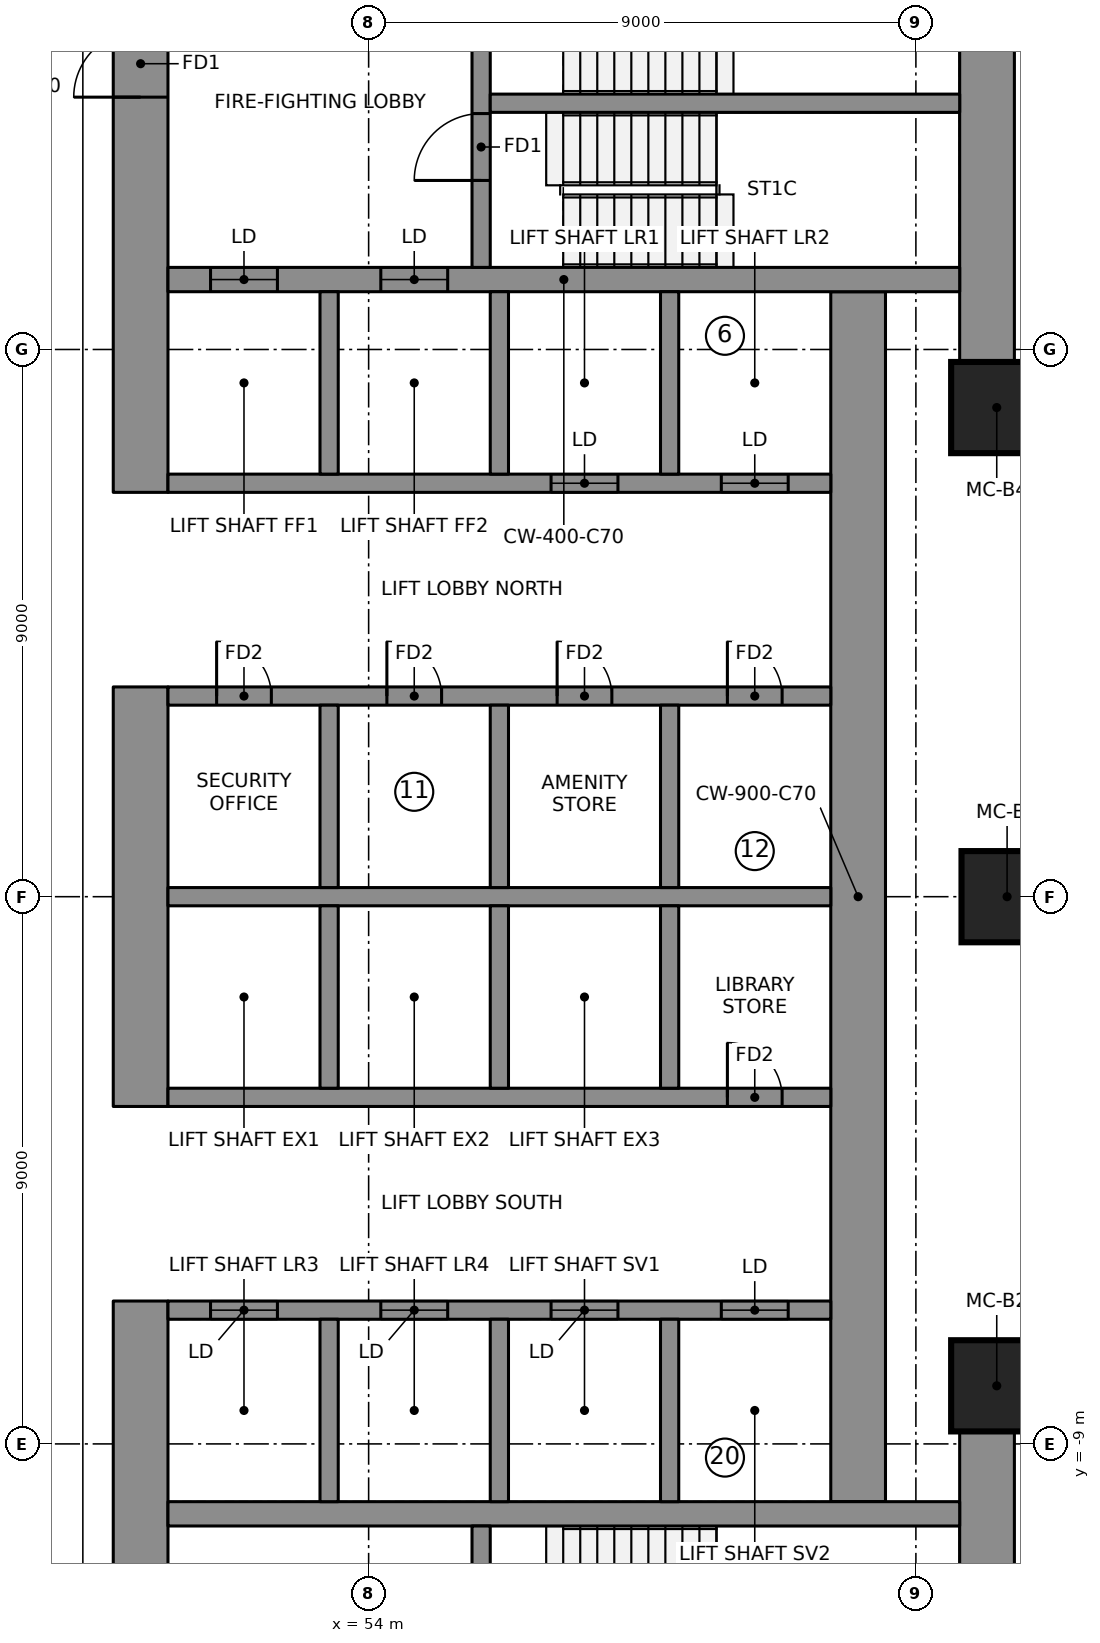
"""IFC4 building model, lengths in metres.
Left out: names, types, materials, properties, quantities, classifications, styles, units other than length and angle.
Written with IfcOpenShell. Run it as: python <this file> out.ifc"""

import sys

from ifc_helpers import new_model, si_unit, direction, frame, frame_2d, origin, origin_2d, place, context, subcontext, project, spatial, rectangle, extrude, element, fill, save


model = new_model("IFC4")
c1 = context("Model", 3, precision=1e-05, world=origin(), true_north=direction((0.0, 1.0)))
c2 = subcontext(c1, "Body", "Model", "MODEL_VIEW")
j1 = project(units=[si_unit("LENGTHUNIT", "METRE"), si_unit("PLANEANGLEUNIT", "RADIAN")], contexts=[c1])
p1 = place(None, origin())
s1 = spatial("IfcSite", under=j1, at=p1, CompositionType="ELEMENT")
p2 = place(p1, origin())
s2 = spatial("IfcBuilding", under=s1, at=p2, CompositionType="ELEMENT")
p3 = place(p2, frame((0.0, 0.0, 140.85)))
s3 = spatial("IfcBuildingStorey", under=s2, at=p3, CompositionType="ELEMENT", Elevation=140.85)
p4 = place(p3, frame((50.25, 6.65, 0.0), z_axis=(0.0, 0.0, 1.0), x_axis=(0.0, 1.0, 0.0)))
e1 = element("IfcWall", 1, at=p4, inside=s3, PredefinedType="SHEAR", context=c2, shape_type="SweptSolid", body=[
    extrude(rectangle(XDim=10.0, YDim=0.9, at=frame_2d((5.0, 0.0))), origin(), (0.0, 0.0, 1.0), 3.55),
])
p5 = place(p4, frame((6.5, 0.0, 0.0)))
e2 = element("IfcOpeningElement", 2, at=p5, cuts=e1, PredefinedType="OPENING", context=c2, shape_type="SweptSolid", body=[
    extrude(rectangle(XDim=1.1, YDim=2.1, at=frame_2d((0.55, 1.05))), frame((0.0, 0.46, 0.0), z_axis=(0.0, -1.0, 0.0), x_axis=(1.0, 0.0, 0.0)), (0.0, 0.0, 1.0), 0.92),
])
p6 = place(p3, frame((50.25, -3.45, 0.0), z_axis=(0.0, 0.0, 1.0), x_axis=(0.0, 1.0, 0.0)))
e3 = element("IfcWall", 3, at=p6, inside=s3, PredefinedType="SHEAR", context=c2, shape_type="SweptSolid", body=[
    extrude(rectangle(XDim=6.9, YDim=0.9, at=frame_2d((3.45, 0.0))), origin(), (0.0, 0.0, 1.0), 3.55),
])
p7 = place(p3, frame((50.25, -16.65, 0.0), z_axis=(0.0, 0.0, 1.0), x_axis=(0.0, 1.0, 0.0)))
e4 = element("IfcWall", 4, at=p7, inside=s3, PredefinedType="SHEAR", context=c2, shape_type="SweptSolid", body=[
    extrude(rectangle(XDim=10.0, YDim=0.9, at=frame_2d((5.0, 0.0))), origin(), (0.0, 0.0, 1.0), 3.55),
])
p8 = place(p7, frame((2.4, 0.0, 0.0)))
e5 = element("IfcOpeningElement", 5, at=p8, cuts=e4, PredefinedType="OPENING", context=c2, shape_type="SweptSolid", body=[
    extrude(rectangle(XDim=1.1, YDim=2.1, at=frame_2d((0.55, 1.05))), frame((0.0, 0.46, 0.0), z_axis=(0.0, -1.0, 0.0), x_axis=(1.0, 0.0, 0.0)), (0.0, 0.0, 1.0), 0.92),
])
for number, where, z_axis, x_axis in (
    (6, (64.17, 8.745, 0.0), (0.0, 0.0, 1.0), (0.0, 1.0, 0.0)),
    (7, (64.17, -15.75, 0.0), (0.0, 0.0, 1.0), (0.0, 1.0, 0.0)),
):
    element("IfcWall", number, at=place(p3, frame(where, z_axis=z_axis, x_axis=x_axis)), inside=s3, PredefinedType="SHEAR", context=c2, shape_type="SweptSolid", body=[
        extrude(rectangle(XDim=7.005, YDim=0.9, at=frame_2d((3.503, 0.0))), origin(), (0.0, 0.0, 1.0), 3.55),
    ])
p9 = place(p3, frame((62.05, -9.95, 0.0), z_axis=(0.0, 0.0, 1.0), x_axis=(0.0, 1.0, 0.0)))
e8 = element("IfcWall", 8, at=p9, inside=s3, PredefinedType="SHEAR", context=c2, shape_type="SweptSolid", body=[
    extrude(rectangle(XDim=19.9, YDim=0.9, at=frame_2d((9.95, 0.0))), origin(), (0.0, 0.0, 1.0), 3.55),
])
p10 = place(p3, frame((50.7, 10.15, 0.0), z_axis=(0.0, 0.0, 1.0), x_axis=(1.0, 0.0, 0.0)))
e9 = element("IfcWall", 9, at=p10, inside=s3, PredefinedType="SHEAR", context=c2, shape_type="SweptSolid", body=[
    extrude(rectangle(XDim=13.02, YDim=0.4, at=frame_2d((6.51, 0.0))), origin(), (0.0, 0.0, 1.0), 3.55),
])
p11 = place(p10, frame((0.7, 0.0, 0.0)))
e10 = element("IfcOpeningElement", 10, at=p11, cuts=e9, PredefinedType="OPENING", context=c2, shape_type="SweptSolid", body=[
    extrude(rectangle(XDim=1.1, YDim=2.1, at=frame_2d((0.55, 1.05))), frame((0.0, 0.21, 0.0), z_axis=(0.0, -1.0, 0.0), x_axis=(1.0, 0.0, 0.0)), (0.0, 0.0, 1.0), 0.42),
])
p12 = place(p10, frame((3.5, 0.0, 0.0)))
e11 = element("IfcOpeningElement", 11, at=p12, cuts=e9, PredefinedType="OPENING", context=c2, shape_type="SweptSolid", body=[
    extrude(rectangle(XDim=1.1, YDim=2.1, at=frame_2d((0.55, 1.05))), frame((0.0, 0.21, 0.0), z_axis=(0.0, -1.0, 0.0), x_axis=(1.0, 0.0, 0.0)), (0.0, 0.0, 1.0), 0.42),
])
p13 = place(p3, frame((50.7, -10.15, 0.0), z_axis=(0.0, 0.0, 1.0), x_axis=(1.0, 0.0, 0.0)))
e12 = element("IfcWall", 12, at=p13, inside=s3, PredefinedType="SHEAR", context=c2, shape_type="SweptSolid", body=[
    extrude(rectangle(XDim=13.02, YDim=0.4, at=frame_2d((6.51, 0.0))), origin(), (0.0, 0.0, 1.0), 3.55),
])
p14 = place(p3, frame((50.7, 0.0, 0.0), z_axis=(0.0, 0.0, 1.0), x_axis=(1.0, 0.0, 0.0)))
e13 = element("IfcWall", 13, at=p14, inside=s3, PredefinedType="SHEAR", context=c2, shape_type="SweptSolid", body=[
    extrude(rectangle(XDim=10.9, YDim=0.3, at=frame_2d((5.45, 0.0))), origin(), (0.0, 0.0, 1.0), 3.55),
])
p15 = place(p3, frame((50.7, 3.3, 0.0), z_axis=(0.0, 0.0, 1.0), x_axis=(1.0, 0.0, 0.0)))
e14 = element("IfcWall", 14, at=p15, inside=s3, PredefinedType="SHEAR", context=c2, shape_type="SweptSolid", body=[
    extrude(rectangle(XDim=10.9, YDim=0.3, at=frame_2d((5.45, 0.0))), origin(), (0.0, 0.0, 1.0), 3.55),
])
p16 = place(p15, frame((0.8, 0.0, 0.0)))
e15 = element("IfcOpeningElement", 15, at=p16, cuts=e14, PredefinedType="OPENING", context=c2, shape_type="SweptSolid", body=[
    extrude(rectangle(XDim=0.9, YDim=2.1, at=frame_2d((0.45, 1.05))), frame((0.0, 0.16, 0.0), z_axis=(0.0, -1.0, 0.0), x_axis=(1.0, 0.0, 0.0)), (0.0, 0.0, 1.0), 0.32),
])
p17 = place(p15, frame((3.6, 0.0, 0.0)))
e16 = element("IfcOpeningElement", 16, at=p17, cuts=e14, PredefinedType="OPENING", context=c2, shape_type="SweptSolid", body=[
    extrude(rectangle(XDim=0.9, YDim=2.1, at=frame_2d((0.45, 1.05))), frame((0.0, 0.16, 0.0), z_axis=(0.0, -1.0, 0.0), x_axis=(1.0, 0.0, 0.0)), (0.0, 0.0, 1.0), 0.32),
])
p18 = place(p15, frame((6.4, 0.0, 0.0)))
e17 = element("IfcOpeningElement", 17, at=p18, cuts=e14, PredefinedType="OPENING", context=c2, shape_type="SweptSolid", body=[
    extrude(rectangle(XDim=0.9, YDim=2.1, at=frame_2d((0.45, 1.05))), frame((0.0, 0.16, 0.0), z_axis=(0.0, -1.0, 0.0), x_axis=(1.0, 0.0, 0.0)), (0.0, 0.0, 1.0), 0.32),
])
p19 = place(p15, frame((9.2, 0.0, 0.0)))
e18 = element("IfcOpeningElement", 18, at=p19, cuts=e14, PredefinedType="OPENING", context=c2, shape_type="SweptSolid", body=[
    extrude(rectangle(XDim=0.9, YDim=2.1, at=frame_2d((0.45, 1.05))), frame((0.0, 0.16, 0.0), z_axis=(0.0, -1.0, 0.0), x_axis=(1.0, 0.0, 0.0)), (0.0, 0.0, 1.0), 0.32),
])
p20 = place(p3, frame((50.7, 6.8, 0.0), z_axis=(0.0, 0.0, 1.0), x_axis=(1.0, 0.0, 0.0)))
e19 = element("IfcWall", 19, at=p20, inside=s3, PredefinedType="SHEAR", context=c2, shape_type="SweptSolid", body=[
    extrude(rectangle(XDim=10.9, YDim=0.3, at=frame_2d((5.45, 0.0))), origin(), (0.0, 0.0, 1.0), 3.55),
])
p21 = place(p20, frame((6.3, 0.0, 0.0)))
e20 = element("IfcOpeningElement", 20, at=p21, cuts=e19, PredefinedType="OPENING", context=c2, shape_type="SweptSolid", body=[
    extrude(rectangle(XDim=1.1, YDim=2.1, at=frame_2d((0.55, 1.05))), frame((0.0, 0.16, 0.0), z_axis=(0.0, -1.0, 0.0), x_axis=(1.0, 0.0, 0.0)), (0.0, 0.0, 1.0), 0.32),
])
p22 = place(p20, frame((9.1, 0.0, 0.0)))
e21 = element("IfcOpeningElement", 21, at=p22, cuts=e19, PredefinedType="OPENING", context=c2, shape_type="SweptSolid", body=[
    extrude(rectangle(XDim=1.1, YDim=2.1, at=frame_2d((0.55, 1.05))), frame((0.0, 0.16, 0.0), z_axis=(0.0, -1.0, 0.0), x_axis=(1.0, 0.0, 0.0)), (0.0, 0.0, 1.0), 0.32),
])
for number, where, z_axis, x_axis in (
    (22, (53.35, 0.15, 0.0), (0.0, 0.0, 1.0), (0.0, 1.0, 0.0)),
    (23, (53.35, 6.95, 0.0), (0.0, 0.0, 1.0), (0.0, 1.0, 0.0)),
    (24, (56.15, 0.15, 0.0), (0.0, 0.0, 1.0), (0.0, 1.0, 0.0)),
    (25, (56.15, 6.95, 0.0), (0.0, 0.0, 1.0), (0.0, 1.0, 0.0)),
    (26, (58.95, 0.15, 0.0), (0.0, 0.0, 1.0), (0.0, 1.0, 0.0)),
    (27, (58.95, 6.95, 0.0), (0.0, 0.0, 1.0), (0.0, 1.0, 0.0)),
):
    element("IfcWall", number, at=place(p3, frame(where, z_axis=z_axis, x_axis=x_axis)), inside=s3, PredefinedType="SHEAR", context=c2, shape_type="SweptSolid", body=[
        extrude(rectangle(XDim=3.0, YDim=0.3, at=frame_2d((1.5, 0.0))), origin(), (0.0, 0.0, 1.0), 3.55),
    ])
p23 = place(p3, frame((50.7, -3.3, 0.0), z_axis=(0.0, 0.0, 1.0), x_axis=(1.0, 0.0, 0.0)))
e28 = element("IfcWall", 28, at=p23, inside=s3, PredefinedType="SHEAR", context=c2, shape_type="SweptSolid", body=[
    extrude(rectangle(XDim=10.9, YDim=0.3, at=frame_2d((5.45, 0.0))), origin(), (0.0, 0.0, 1.0), 3.55),
])
p24 = place(p23, frame((9.2, 0.0, 0.0)))
e29 = element("IfcOpeningElement", 29, at=p24, cuts=e28, PredefinedType="OPENING", context=c2, shape_type="SweptSolid", body=[
    extrude(rectangle(XDim=0.9, YDim=2.1, at=frame_2d((0.45, 1.05))), frame((0.0, 0.16, 0.0), z_axis=(0.0, -1.0, 0.0), x_axis=(1.0, 0.0, 0.0)), (0.0, 0.0, 1.0), 0.32),
])
p25 = place(p3, frame((50.7, -6.8, 0.0), z_axis=(0.0, 0.0, 1.0), x_axis=(1.0, 0.0, 0.0)))
e30 = element("IfcWall", 30, at=p25, inside=s3, PredefinedType="SHEAR", context=c2, shape_type="SweptSolid", body=[
    extrude(rectangle(XDim=10.9, YDim=0.3, at=frame_2d((5.45, 0.0))), origin(), (0.0, 0.0, 1.0), 3.55),
])
p26 = place(p25, frame((0.7, 0.0, 0.0)))
e31 = element("IfcOpeningElement", 31, at=p26, cuts=e30, PredefinedType="OPENING", context=c2, shape_type="SweptSolid", body=[
    extrude(rectangle(XDim=1.1, YDim=2.1, at=frame_2d((0.55, 1.05))), frame((0.0, 0.16, 0.0), z_axis=(0.0, -1.0, 0.0), x_axis=(1.0, 0.0, 0.0)), (0.0, 0.0, 1.0), 0.32),
])
p27 = place(p25, frame((3.5, 0.0, 0.0)))
e32 = element("IfcOpeningElement", 32, at=p27, cuts=e30, PredefinedType="OPENING", context=c2, shape_type="SweptSolid", body=[
    extrude(rectangle(XDim=1.1, YDim=2.1, at=frame_2d((0.55, 1.05))), frame((0.0, 0.16, 0.0), z_axis=(0.0, -1.0, 0.0), x_axis=(1.0, 0.0, 0.0)), (0.0, 0.0, 1.0), 0.32),
])
p28 = place(p25, frame((6.3, 0.0, 0.0)))
e33 = element("IfcOpeningElement", 33, at=p28, cuts=e30, PredefinedType="OPENING", context=c2, shape_type="SweptSolid", body=[
    extrude(rectangle(XDim=1.1, YDim=2.1, at=frame_2d((0.55, 1.05))), frame((0.0, 0.16, 0.0), z_axis=(0.0, -1.0, 0.0), x_axis=(1.0, 0.0, 0.0)), (0.0, 0.0, 1.0), 0.32),
])
p29 = place(p25, frame((9.1, 0.0, 0.0)))
e34 = element("IfcOpeningElement", 34, at=p29, cuts=e30, PredefinedType="OPENING", context=c2, shape_type="SweptSolid", body=[
    extrude(rectangle(XDim=1.1, YDim=2.1, at=frame_2d((0.55, 1.05))), frame((0.0, 0.16, 0.0), z_axis=(0.0, -1.0, 0.0), x_axis=(1.0, 0.0, 0.0)), (0.0, 0.0, 1.0), 0.32),
])
for number, where, z_axis, x_axis in (
    (35, (53.35, -3.15, 0.0), (0.0, 0.0, 1.0), (0.0, 1.0, 0.0)),
    (36, (53.35, -9.95, 0.0), (0.0, 0.0, 1.0), (0.0, 1.0, 0.0)),
    (37, (56.15, -3.15, 0.0), (0.0, 0.0, 1.0), (0.0, 1.0, 0.0)),
    (38, (56.15, -9.95, 0.0), (0.0, 0.0, 1.0), (0.0, 1.0, 0.0)),
    (39, (58.95, -3.15, 0.0), (0.0, 0.0, 1.0), (0.0, 1.0, 0.0)),
    (40, (58.95, -9.95, 0.0), (0.0, 0.0, 1.0), (0.0, 1.0, 0.0)),
):
    element("IfcWall", number, at=place(p3, frame(where, z_axis=z_axis, x_axis=x_axis)), inside=s3, PredefinedType="SHEAR", context=c2, shape_type="SweptSolid", body=[
        extrude(rectangle(XDim=3.0, YDim=0.3, at=frame_2d((1.5, 0.0))), origin(), (0.0, 0.0, 1.0), 3.55),
    ])
p30 = place(p3, frame((55.85, 10.35, 0.0), z_axis=(0.0, 0.0, 1.0), x_axis=(0.0, 1.0, 0.0)))
e41 = element("IfcWall", 41, at=p30, inside=s3, PredefinedType="SHEAR", context=c2, shape_type="SweptSolid", body=[
    extrude(rectangle(XDim=5.4, YDim=0.3, at=frame_2d((2.7, 0.0))), origin(), (0.0, 0.0, 1.0), 3.55),
])
p31 = place(p30, frame((1.43, 0.0, 0.0)))
e42 = element("IfcOpeningElement", 42, at=p31, cuts=e41, PredefinedType="OPENING", context=c2, shape_type="SweptSolid", body=[
    extrude(rectangle(XDim=1.1, YDim=2.1, at=frame_2d((0.55, 1.05))), frame((0.0, 0.16, 0.0), z_axis=(0.0, -1.0, 0.0), x_axis=(1.0, 0.0, 0.0)), (0.0, 0.0, 1.0), 0.32),
])
p32 = place(p30, frame((3.6, 0.0, 0.0)))
e43 = element("IfcOpeningElement", 43, at=p32, cuts=e41, PredefinedType="OPENING", context=c2, shape_type="SweptSolid", body=[
    extrude(rectangle(XDim=1.1, YDim=2.1, at=frame_2d((0.55, 1.05))), frame((0.0, 0.16, 0.0), z_axis=(0.0, -1.0, 0.0), x_axis=(1.0, 0.0, 0.0)), (0.0, 0.0, 1.0), 0.32),
])
p33 = place(p3, frame((55.85, -15.75, 0.0), z_axis=(0.0, 0.0, 1.0), x_axis=(0.0, 1.0, 0.0)))
e44 = element("IfcWall", 44, at=p33, inside=s3, PredefinedType="SHEAR", context=c2, shape_type="SweptSolid", body=[
    extrude(rectangle(XDim=5.4, YDim=0.3, at=frame_2d((2.7, 0.0))), origin(), (0.0, 0.0, 1.0), 3.55),
])
p34 = place(p33, frame((3.6, 0.0, 0.0)))
e45 = element("IfcOpeningElement", 45, at=p34, cuts=e44, PredefinedType="OPENING", context=c2, shape_type="SweptSolid", body=[
    extrude(rectangle(XDim=1.1, YDim=2.1, at=frame_2d((0.55, 1.05))), frame((0.0, 0.16, 0.0), z_axis=(0.0, -1.0, 0.0), x_axis=(1.0, 0.0, 0.0)), (0.0, 0.0, 1.0), 0.32),
])
p35 = place(p33, frame((0.8, 0.0, 0.0)))
e46 = element("IfcOpeningElement", 46, at=p35, cuts=e44, PredefinedType="OPENING", context=c2, shape_type="SweptSolid", body=[
    extrude(rectangle(XDim=0.9, YDim=2.1, at=frame_2d((0.45, 1.05))), frame((0.0, 0.16, 0.0), z_axis=(0.0, -1.0, 0.0), x_axis=(1.0, 0.0, 0.0)), (0.0, 0.0, 1.0), 0.32),
])
p36 = place(p3, frame((56.0, 13.05, 0.0), z_axis=(0.0, 0.0, 1.0), x_axis=(1.0, 0.0, 0.0)))
e47 = element("IfcWall", 47, at=p36, inside=s3, PredefinedType="SHEAR", context=c2, shape_type="SweptSolid", body=[
    extrude(rectangle(XDim=7.72, YDim=0.3, at=frame_2d((3.86, 0.0))), origin(), (0.0, 0.0, 1.0), 3.55),
])
for number, where, z_axis, x_axis in (
    (48, (64.33, -8.045, 0.0), (0.0, 0.0, 1.0), (1.0, 0.0, 0.0)),
    (49, (64.5, 0.0, 0.0), (0.0, 0.0, 1.0), (1.0, 0.0, 0.0)),
    (50, (64.33, 8.045, 0.0), (0.0, 0.0, 1.0), (1.0, 0.0, 0.0)),
):
    element("IfcColumn", number, at=place(p3, frame(where, z_axis=z_axis, x_axis=x_axis)), inside=s3, PredefinedType="COLUMN", context=c2, shape_type="SweptSolid", body=[
        extrude(rectangle(XDim=1.5, YDim=1.5, at=origin_2d()), origin(), (0.0, 0.0, 1.0), 3.55),
    ])
p37 = place(p11, origin())
e51 = element("IfcDoor", 51, at=p37, inside=s3, OperationType="DOUBLE_DOOR_SLIDING", PredefinedType="DOOR", context=c2, shape_type="SweptSolid", body=[
    extrude(rectangle(XDim=1.1, YDim=2.1, at=frame_2d((0.55, 1.05))), frame((0.0, 0.025, 0.0), z_axis=(0.0, -1.0, 0.0), x_axis=(1.0, 0.0, 0.0)), (0.0, 0.0, 1.0), 0.05),
])
fill(e10, e51)
p38 = place(p12, origin())
e52 = element("IfcDoor", 52, at=p38, inside=s3, OperationType="DOUBLE_DOOR_SLIDING", PredefinedType="DOOR", context=c2, shape_type="SweptSolid", body=[
    extrude(rectangle(XDim=1.1, YDim=2.1, at=frame_2d((0.55, 1.05))), frame((0.0, 0.025, 0.0), z_axis=(0.0, -1.0, 0.0), x_axis=(1.0, 0.0, 0.0)), (0.0, 0.0, 1.0), 0.05),
])
fill(e11, e52)
p39 = place(p21, origin())
e53 = element("IfcDoor", 53, at=p39, inside=s3, OperationType="DOUBLE_DOOR_SLIDING", PredefinedType="DOOR", context=c2, shape_type="SweptSolid", body=[
    extrude(rectangle(XDim=1.1, YDim=2.1, at=frame_2d((0.55, 1.05))), frame((0.0, 0.025, 0.0), z_axis=(0.0, -1.0, 0.0), x_axis=(1.0, 0.0, 0.0)), (0.0, 0.0, 1.0), 0.05),
])
fill(e20, e53)
p40 = place(p22, origin())
e54 = element("IfcDoor", 54, at=p40, inside=s3, OperationType="DOUBLE_DOOR_SLIDING", PredefinedType="DOOR", context=c2, shape_type="SweptSolid", body=[
    extrude(rectangle(XDim=1.1, YDim=2.1, at=frame_2d((0.55, 1.05))), frame((0.0, 0.025, 0.0), z_axis=(0.0, -1.0, 0.0), x_axis=(1.0, 0.0, 0.0)), (0.0, 0.0, 1.0), 0.05),
])
fill(e21, e54)
p41 = place(p26, origin())
e55 = element("IfcDoor", 55, at=p41, inside=s3, OperationType="DOUBLE_DOOR_SLIDING", PredefinedType="DOOR", context=c2, shape_type="SweptSolid", body=[
    extrude(rectangle(XDim=1.1, YDim=2.1, at=frame_2d((0.55, 1.05))), frame((0.0, 0.025, 0.0), z_axis=(0.0, -1.0, 0.0), x_axis=(1.0, 0.0, 0.0)), (0.0, 0.0, 1.0), 0.05),
])
fill(e31, e55)
p42 = place(p27, origin())
e56 = element("IfcDoor", 56, at=p42, inside=s3, OperationType="DOUBLE_DOOR_SLIDING", PredefinedType="DOOR", context=c2, shape_type="SweptSolid", body=[
    extrude(rectangle(XDim=1.1, YDim=2.1, at=frame_2d((0.55, 1.05))), frame((0.0, 0.025, 0.0), z_axis=(0.0, -1.0, 0.0), x_axis=(1.0, 0.0, 0.0)), (0.0, 0.0, 1.0), 0.05),
])
fill(e32, e56)
p43 = place(p28, origin())
e57 = element("IfcDoor", 57, at=p43, inside=s3, OperationType="DOUBLE_DOOR_SLIDING", PredefinedType="DOOR", context=c2, shape_type="SweptSolid", body=[
    extrude(rectangle(XDim=1.1, YDim=2.1, at=frame_2d((0.55, 1.05))), frame((0.0, 0.025, 0.0), z_axis=(0.0, -1.0, 0.0), x_axis=(1.0, 0.0, 0.0)), (0.0, 0.0, 1.0), 0.05),
])
fill(e33, e57)
p44 = place(p29, origin())
e58 = element("IfcDoor", 58, at=p44, inside=s3, OperationType="DOUBLE_DOOR_SLIDING", PredefinedType="DOOR", context=c2, shape_type="SweptSolid", body=[
    extrude(rectangle(XDim=1.1, YDim=2.1, at=frame_2d((0.55, 1.05))), frame((0.0, 0.025, 0.0), z_axis=(0.0, -1.0, 0.0), x_axis=(1.0, 0.0, 0.0)), (0.0, 0.0, 1.0), 0.05),
])
fill(e34, e58)
p45 = place(p31, origin())
e59 = element("IfcDoor", 59, at=p45, inside=s3, OperationType="SINGLE_SWING_RIGHT", PredefinedType="DOOR", context=c2, shape_type="SweptSolid", body=[
    extrude(rectangle(XDim=1.1, YDim=2.1, at=frame_2d((0.55, 1.05))), frame((0.0, 0.025, 0.0), z_axis=(0.0, -1.0, 0.0), x_axis=(1.0, 0.0, 0.0)), (0.0, 0.0, 1.0), 0.05),
])
fill(e42, e59)
p46 = place(p5, origin())
e60 = element("IfcDoor", 60, at=p46, inside=s3, OperationType="SINGLE_SWING_RIGHT", PredefinedType="DOOR", context=c2, shape_type="SweptSolid", body=[
    extrude(rectangle(XDim=1.1, YDim=2.1, at=frame_2d((0.55, 1.05))), frame((0.0, 0.025, 0.0), z_axis=(0.0, -1.0, 0.0), x_axis=(1.0, 0.0, 0.0)), (0.0, 0.0, 1.0), 0.05),
])
fill(e2, e60)
p47 = place(p16, origin())
e61 = element("IfcDoor", 61, at=p47, inside=s3, OperationType="SINGLE_SWING_LEFT", PredefinedType="DOOR", context=c2, shape_type="SweptSolid", body=[
    extrude(rectangle(XDim=0.9, YDim=2.1, at=frame_2d((0.45, 1.05))), frame((0.0, 0.025, 0.0), z_axis=(0.0, -1.0, 0.0), x_axis=(1.0, 0.0, 0.0)), (0.0, 0.0, 1.0), 0.05),
])
fill(e15, e61)
p48 = place(p17, origin())
e62 = element("IfcDoor", 62, at=p48, inside=s3, OperationType="SINGLE_SWING_LEFT", PredefinedType="DOOR", context=c2, shape_type="SweptSolid", body=[
    extrude(rectangle(XDim=0.9, YDim=2.1, at=frame_2d((0.45, 1.05))), frame((0.0, 0.025, 0.0), z_axis=(0.0, -1.0, 0.0), x_axis=(1.0, 0.0, 0.0)), (0.0, 0.0, 1.0), 0.05),
])
fill(e16, e62)
p49 = place(p18, origin())
e63 = element("IfcDoor", 63, at=p49, inside=s3, OperationType="SINGLE_SWING_LEFT", PredefinedType="DOOR", context=c2, shape_type="SweptSolid", body=[
    extrude(rectangle(XDim=0.9, YDim=2.1, at=frame_2d((0.45, 1.05))), frame((0.0, 0.025, 0.0), z_axis=(0.0, -1.0, 0.0), x_axis=(1.0, 0.0, 0.0)), (0.0, 0.0, 1.0), 0.05),
])
fill(e17, e63)
p50 = place(p19, origin())
e64 = element("IfcDoor", 64, at=p50, inside=s3, OperationType="SINGLE_SWING_LEFT", PredefinedType="DOOR", context=c2, shape_type="SweptSolid", body=[
    extrude(rectangle(XDim=0.9, YDim=2.1, at=frame_2d((0.45, 1.05))), frame((0.0, 0.025, 0.0), z_axis=(0.0, -1.0, 0.0), x_axis=(1.0, 0.0, 0.0)), (0.0, 0.0, 1.0), 0.05),
])
fill(e18, e64)
p51 = place(p24, origin())
e65 = element("IfcDoor", 65, at=p51, inside=s3, OperationType="SINGLE_SWING_LEFT", PredefinedType="DOOR", context=c2, shape_type="SweptSolid", body=[
    extrude(rectangle(XDim=0.9, YDim=2.1, at=frame_2d((0.45, 1.05))), frame((0.0, 0.025, 0.0), z_axis=(0.0, -1.0, 0.0), x_axis=(1.0, 0.0, 0.0)), (0.0, 0.0, 1.0), 0.05),
])
fill(e29, e65)
save(model, sys.argv[1])
